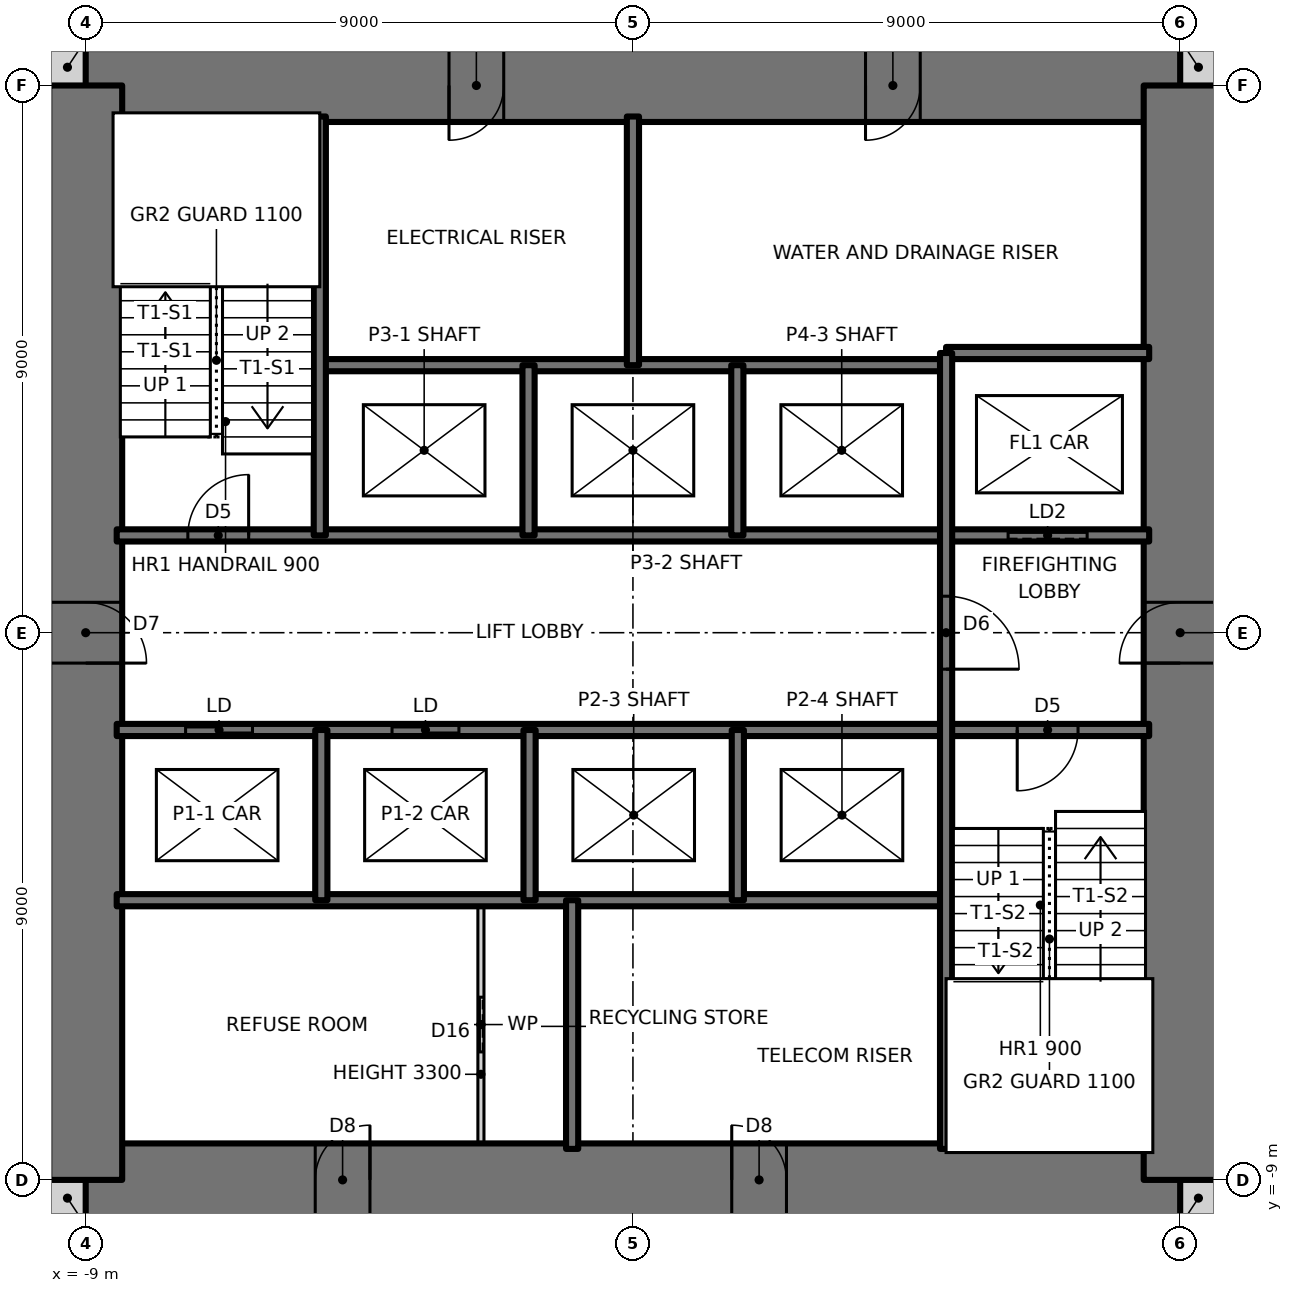
"""IFC4 building model, lengths in metres.
Left out: names, types, materials, properties, quantities, classifications, styles, units other than length and angle.
Written with IfcOpenShell. Run it as: python <this file> out.ifc"""

import sys

from ifc_helpers import new_model, si_unit, direction, frame, frame_2d, origin, place, context, subcontext, project, spatial, rectangle, extrude, element, fill, save


model = new_model("IFC4")
c1 = context("Model", 3, precision=1e-05, world=origin(), true_north=direction((0.0, 1.0)))
c2 = subcontext(c1, "Body", "Model", "MODEL_VIEW")
j1 = project(units=[si_unit("LENGTHUNIT", "METRE"), si_unit("PLANEANGLEUNIT", "RADIAN")], contexts=[c1])
p1 = place(None, origin())
s1 = spatial("IfcSite", under=j1, at=p1, CompositionType="ELEMENT")
p2 = place(p1, origin())
s2 = spatial("IfcBuilding", under=s1, at=p2, CompositionType="ELEMENT")
p3 = place(p2, frame((0.0, 0.0, 67.5)))
s3 = spatial("IfcBuildingStorey", under=s2, at=p3, CompositionType="ELEMENT", Elevation=67.5)
for number, where, z_axis, x_axis in (
    (1, (-9.6, -9.3, 0.0), (0.0, 0.0, 1.0), (1.0, 0.0, 0.0)),
    (2, (9.0, -9.3, 0.0), (0.0, 0.0, 1.0), (1.0, 0.0, 0.0)),
    (3, (9.0, 9.3, 0.0), (0.0, 0.0, 1.0), (1.0, 0.0, 0.0)),
    (4, (-9.6, 9.3, 0.0), (0.0, 0.0, 1.0), (1.0, 0.0, 0.0)),
):
    element("IfcWall", number, at=place(p3, frame(where, z_axis=z_axis, x_axis=x_axis)), inside=s3, PredefinedType="SOLIDWALL", context=c2, shape_type="SweptSolid", body=[
        extrude(rectangle(XDim=0.6, YDim=0.6, at=frame_2d((0.3, 0.0))), origin(), (0.0, 0.0, 1.0), 3.5),
    ])
p4 = place(p3, frame((-9.0, -9.0, 0.0), z_axis=(0.0, 0.0, 1.0), x_axis=(1.0, 0.0, 0.0)))
e5 = element("IfcWall", 5, at=p4, inside=s3, PredefinedType="SHEAR", context=c2, shape_type="SweptSolid", body=[
    extrude(rectangle(XDim=18.0, YDim=1.2, at=frame_2d((9.0, 0.0))), origin(), (0.0, 0.0, 1.0), 3.5),
])
p5 = place(p4, frame((3.775, 0.0, 0.0)))
e6 = element("IfcOpeningElement", 6, at=p5, cuts=e5, PredefinedType="OPENING", context=c2, shape_type="SweptSolid", body=[
    extrude(rectangle(XDim=0.9, YDim=2.1, at=frame_2d((0.45, 1.05))), frame((0.0, 0.61, 0.0), z_axis=(0.0, -1.0, 0.0), x_axis=(1.0, 0.0, 0.0)), (0.0, 0.0, 1.0), 1.22),
])
p6 = place(p4, frame((10.625, 0.0, 0.0)))
e7 = element("IfcOpeningElement", 7, at=p6, cuts=e5, PredefinedType="OPENING", context=c2, shape_type="SweptSolid", body=[
    extrude(rectangle(XDim=0.9, YDim=2.1, at=frame_2d((0.45, 1.05))), frame((0.0, 0.61, 0.0), z_axis=(0.0, -1.0, 0.0), x_axis=(1.0, 0.0, 0.0)), (0.0, 0.0, 1.0), 1.22),
])
p7 = place(p3, frame((9.0, 9.0, 0.0), z_axis=(0.0, 0.0, 1.0), x_axis=(-1.0, 0.0, 0.0)))
e8 = element("IfcWall", 8, at=p7, inside=s3, PredefinedType="SHEAR", context=c2, shape_type="SweptSolid", body=[
    extrude(rectangle(XDim=18.0, YDim=1.2, at=frame_2d((9.0, 0.0))), origin(), (0.0, 0.0, 1.0), 3.5),
])
p8 = place(p7, frame((11.125, 0.0, 0.0)))
e9 = element("IfcOpeningElement", 9, at=p8, cuts=e8, PredefinedType="OPENING", context=c2, shape_type="SweptSolid", body=[
    extrude(rectangle(XDim=0.9, YDim=2.1, at=frame_2d((0.45, 1.05))), frame((0.0, 0.61, 0.0), z_axis=(0.0, -1.0, 0.0), x_axis=(1.0, 0.0, 0.0)), (0.0, 0.0, 1.0), 1.22),
])
p9 = place(p7, frame((4.275, 0.0, 0.0)))
e10 = element("IfcOpeningElement", 10, at=p9, cuts=e8, PredefinedType="OPENING", context=c2, shape_type="SweptSolid", body=[
    extrude(rectangle(XDim=0.9, YDim=2.1, at=frame_2d((0.45, 1.05))), frame((0.0, 0.61, 0.0), z_axis=(0.0, -1.0, 0.0), x_axis=(1.0, 0.0, 0.0)), (0.0, 0.0, 1.0), 1.22),
])
p10 = place(p3, frame((9.0, -9.0, 0.0), z_axis=(0.0, 0.0, 1.0), x_axis=(0.0, 1.0, 0.0)))
e11 = element("IfcWall", 11, at=p10, inside=s3, PredefinedType="SHEAR", context=c2, shape_type="SweptSolid", body=[
    extrude(rectangle(XDim=18.0, YDim=1.2, at=frame_2d((9.0, 0.0))), origin(), (0.0, 0.0, 1.0), 3.5),
])
p11 = place(p10, frame((8.5, 0.0, 0.0)))
e12 = element("IfcOpeningElement", 12, at=p11, cuts=e11, PredefinedType="OPENING", context=c2, shape_type="SweptSolid", body=[
    extrude(rectangle(XDim=1.0, YDim=2.1, at=frame_2d((0.5, 1.05))), frame((0.0, 0.61, 0.0), z_axis=(0.0, -1.0, 0.0), x_axis=(1.0, 0.0, 0.0)), (0.0, 0.0, 1.0), 1.22),
])
p12 = place(p3, frame((-9.0, 9.0, 0.0), z_axis=(0.0, 0.0, 1.0), x_axis=(0.0, -1.0, 0.0)))
e13 = element("IfcWall", 13, at=p12, inside=s3, PredefinedType="SHEAR", context=c2, shape_type="SweptSolid", body=[
    extrude(rectangle(XDim=18.0, YDim=1.2, at=frame_2d((9.0, 0.0))), origin(), (0.0, 0.0, 1.0), 3.5),
])
p13 = place(p12, frame((8.5, 0.0, 0.0)))
e14 = element("IfcOpeningElement", 14, at=p13, cuts=e13, PredefinedType="OPENING", context=c2, shape_type="SweptSolid", body=[
    extrude(rectangle(XDim=1.0, YDim=2.1, at=frame_2d((0.5, 1.05))), frame((0.0, 0.61, 0.0), z_axis=(0.0, -1.0, 0.0), x_axis=(1.0, 0.0, 0.0)), (0.0, 0.0, 1.0), 1.22),
])
p14 = place(p3, frame((-8.49, -4.4, 0.0), z_axis=(0.0, 0.0, 1.0), x_axis=(1.0, 0.0, 0.0)))
e15 = element("IfcWall", 15, at=p14, inside=s3, PredefinedType="SOLIDWALL", context=c2, shape_type="SweptSolid", body=[
    extrude(rectangle(XDim=13.64, YDim=0.2, at=frame_2d((6.82, 0.0))), origin(), (0.0, 0.0, 1.0), 3.5),
])
p15 = place(p3, frame((-8.49, -1.6, 0.0), z_axis=(0.0, 0.0, 1.0), x_axis=(1.0, 0.0, 0.0)))
e16 = element("IfcWall", 16, at=p15, inside=s3, PredefinedType="SOLIDWALL", context=c2, shape_type="SweptSolid", body=[
    extrude(rectangle(XDim=16.98, YDim=0.2, at=frame_2d((8.49, 0.0))), origin(), (0.0, 0.0, 1.0), 3.5),
])
p16 = place(p15, frame((14.81, 0.0, 0.0)))
e17 = element("IfcOpeningElement", 17, at=p16, cuts=e16, PredefinedType="OPENING", context=c2, shape_type="SweptSolid", body=[
    extrude(rectangle(XDim=1.0, YDim=2.1, at=frame_2d((0.5, 1.05))), frame((0.0, 0.11, 0.0), z_axis=(0.0, -1.0, 0.0), x_axis=(1.0, 0.0, 0.0)), (0.0, 0.0, 1.0), 0.22),
])
p17 = place(p15, frame((1.133, 0.0, 0.0)))
e18 = element("IfcOpeningElement", 18, at=p17, cuts=e16, PredefinedType="OPENING", context=c2, shape_type="SweptSolid", body=[
    extrude(rectangle(XDim=1.1, YDim=2.1, at=frame_2d((0.55, 1.05))), frame((0.0, 0.11, 0.0), z_axis=(0.0, -1.0, 0.0), x_axis=(1.0, 0.0, 0.0)), (0.0, 0.0, 1.0), 0.22),
])
p18 = place(p15, frame((4.528, 0.0, 0.0)))
e19 = element("IfcOpeningElement", 19, at=p18, cuts=e16, PredefinedType="OPENING", context=c2, shape_type="SweptSolid", body=[
    extrude(rectangle(XDim=1.1, YDim=2.1, at=frame_2d((0.55, 1.05))), frame((0.0, 0.11, 0.0), z_axis=(0.0, -1.0, 0.0), x_axis=(1.0, 0.0, 0.0)), (0.0, 0.0, 1.0), 0.22),
])
p19 = place(p3, frame((-8.49, 1.6, 0.0), z_axis=(0.0, 0.0, 1.0), x_axis=(1.0, 0.0, 0.0)))
e20 = element("IfcWall", 20, at=p19, inside=s3, PredefinedType="SOLIDWALL", context=c2, shape_type="SweptSolid", body=[
    extrude(rectangle(XDim=16.98, YDim=0.2, at=frame_2d((8.49, 0.0))), origin(), (0.0, 0.0, 1.0), 3.5),
])
p20 = place(p19, frame((1.17, 0.0, 0.0)))
e21 = element("IfcOpeningElement", 21, at=p20, cuts=e20, PredefinedType="OPENING", context=c2, shape_type="SweptSolid", body=[
    extrude(rectangle(XDim=1.0, YDim=2.1, at=frame_2d((0.5, 1.05))), frame((0.0, 0.11, 0.0), z_axis=(0.0, -1.0, 0.0), x_axis=(1.0, 0.0, 0.0)), (0.0, 0.0, 1.0), 0.22),
])
p21 = place(p19, frame((14.66, 0.0, 0.0)))
e22 = element("IfcOpeningElement", 22, at=p21, cuts=e20, PredefinedType="OPENING", context=c2, shape_type="SweptSolid", body=[
    extrude(rectangle(XDim=1.3, YDim=2.1, at=frame_2d((0.65, 1.05))), frame((0.0, 0.11, 0.0), z_axis=(0.0, -1.0, 0.0), x_axis=(1.0, 0.0, 0.0)), (0.0, 0.0, 1.0), 0.22),
])
p22 = place(p3, frame((-5.15, 4.4, 0.0), z_axis=(0.0, 0.0, 1.0), x_axis=(1.0, 0.0, 0.0)))
e23 = element("IfcWall", 23, at=p22, inside=s3, PredefinedType="SOLIDWALL", context=c2, shape_type="SweptSolid", body=[
    extrude(rectangle(XDim=10.3, YDim=0.2, at=frame_2d((5.15, 0.0))), origin(), (0.0, 0.0, 1.0), 3.5),
])
p23 = place(p3, frame((5.15, 4.6, 0.0), z_axis=(0.0, 0.0, 1.0), x_axis=(1.0, 0.0, 0.0)))
e24 = element("IfcWall", 24, at=p23, inside=s3, PredefinedType="SOLIDWALL", context=c2, shape_type="SweptSolid", body=[
    extrude(rectangle(XDim=3.34, YDim=0.2, at=frame_2d((1.67, 0.0))), origin(), (0.0, 0.0, 1.0), 3.5),
])
p24 = place(p3, frame((5.15, -8.49, 0.0), z_axis=(0.0, 0.0, 1.0), x_axis=(0.0, 1.0, 0.0)))
e25 = element("IfcWall", 25, at=p24, inside=s3, PredefinedType="SOLIDWALL", context=c2, shape_type="SweptSolid", body=[
    extrude(rectangle(XDim=13.09, YDim=0.2, at=frame_2d((6.545, 0.0))), origin(), (0.0, 0.0, 1.0), 3.5),
])
p25 = place(p24, frame((7.89, 0.0, 0.0)))
e26 = element("IfcOpeningElement", 26, at=p25, cuts=e25, PredefinedType="OPENING", context=c2, shape_type="SweptSolid", body=[
    extrude(rectangle(XDim=1.2, YDim=2.1, at=frame_2d((0.6, 1.05))), frame((0.0, 0.11, 0.0), z_axis=(0.0, -1.0, 0.0), x_axis=(1.0, 0.0, 0.0)), (0.0, 0.0, 1.0), 0.22),
])
for number, where, z_axis, x_axis in (
    (27, (1.725, -4.4, 0.0), (0.0, 0.0, 1.0), (0.0, 1.0, 0.0)),
    (28, (1.717, 1.6, 0.0), (0.0, 0.0, 1.0), (0.0, 1.0, 0.0)),
):
    element("IfcWall", number, at=place(p3, frame(where, z_axis=z_axis, x_axis=x_axis)), inside=s3, PredefinedType="SOLIDWALL", context=c2, shape_type="SweptSolid", body=[
        extrude(rectangle(XDim=2.8, YDim=0.2, at=frame_2d((1.4, 0.0))), origin(), (0.0, 0.0, 1.0), 3.5),
    ])
for number, where, z_axis, x_axis in (
    (29, (0.0, 4.4, 0.0), (0.0, 0.0, 1.0), (0.0, 1.0, 0.0)),
    (30, (-1.0, -8.49, 0.0), (0.0, 0.0, 1.0), (0.0, 1.0, 0.0)),
):
    element("IfcWall", number, at=place(p3, frame(where, z_axis=z_axis, x_axis=x_axis)), inside=s3, PredefinedType="SOLIDWALL", context=c2, shape_type="SweptSolid", body=[
        extrude(rectangle(XDim=4.09, YDim=0.2, at=frame_2d((2.045, 0.0))), origin(), (0.0, 0.0, 1.0), 3.5),
    ])
for number, where, z_axis, x_axis in (
    (31, (-1.7, -4.4, 0.0), (0.0, 0.0, 1.0), (0.0, 1.0, 0.0)),
    (32, (-1.717, 1.6, 0.0), (0.0, 0.0, 1.0), (0.0, 1.0, 0.0)),
):
    element("IfcWall", number, at=place(p3, frame(where, z_axis=z_axis, x_axis=x_axis)), inside=s3, PredefinedType="SOLIDWALL", context=c2, shape_type="SweptSolid", body=[
        extrude(rectangle(XDim=2.8, YDim=0.2, at=frame_2d((1.4, 0.0))), origin(), (0.0, 0.0, 1.0), 3.5),
    ])
p26 = place(p3, frame((-2.5, -8.49, 0.0), z_axis=(0.0, 0.0, 1.0), x_axis=(0.0, 1.0, 0.0)))
e33 = element("IfcWall", 33, at=p26, inside=s3, PredefinedType="PARTITIONING", context=c2, shape_type="SweptSolid", body=[
    extrude(rectangle(XDim=4.09, YDim=0.1, at=frame_2d((2.045, 0.0))), origin(), (0.0, 0.0, 1.0), 3.3),
])
p27 = place(p26, frame((1.595, 0.0, 0.0)))
e34 = element("IfcOpeningElement", 34, at=p27, cuts=e33, PredefinedType="OPENING", context=c2, shape_type="SweptSolid", body=[
    extrude(rectangle(XDim=0.9, YDim=2.1, at=frame_2d((0.45, 1.05))), frame((0.0, 0.06, 0.0), z_axis=(0.0, -1.0, 0.0), x_axis=(1.0, 0.0, 0.0)), (0.0, 0.0, 1.0), 0.12),
])
p28 = place(p3, frame((-5.125, -4.4, 0.0), z_axis=(0.0, 0.0, 1.0), x_axis=(0.0, 1.0, 0.0)))
e35 = element("IfcWall", 35, at=p28, inside=s3, PredefinedType="SOLIDWALL", context=c2, shape_type="SweptSolid", body=[
    extrude(rectangle(XDim=2.8, YDim=0.2, at=frame_2d((1.4, 0.0))), origin(), (0.0, 0.0, 1.0), 3.5),
])
p29 = place(p3, frame((-5.15, 1.6, 0.0), z_axis=(0.0, 0.0, 1.0), x_axis=(0.0, 1.0, 0.0)))
e36 = element("IfcWall", 36, at=p29, inside=s3, PredefinedType="SOLIDWALL", context=c2, shape_type="SweptSolid", body=[
    extrude(rectangle(XDim=6.89, YDim=0.2, at=frame_2d((3.445, 0.0))), origin(), (0.0, 0.0, 1.0), 3.5),
])
p30 = place(p20, origin())
e37 = element("IfcDoor", 37, at=p30, inside=s3, OperationType="SINGLE_SWING_RIGHT", PredefinedType="DOOR", context=c2, shape_type="SweptSolid", body=[
    extrude(rectangle(XDim=1.0, YDim=2.1, at=frame_2d((0.5, 1.05))), frame((0.0, 0.025, 0.0), z_axis=(0.0, -1.0, 0.0), x_axis=(1.0, 0.0, 0.0)), (0.0, 0.0, 1.0), 0.05),
])
fill(e21, e37)
p31 = place(p16, frame((1.0, 0.0, 0.0), z_axis=(0.0, 0.0, 1.0), x_axis=(-1.0, 0.0, 0.0)))
e38 = element("IfcDoor", 38, at=p31, inside=s3, OperationType="SINGLE_SWING_RIGHT", PredefinedType="DOOR", context=c2, shape_type="SweptSolid", body=[
    extrude(rectangle(XDim=1.0, YDim=2.1, at=frame_2d((0.5, 1.05))), frame((0.0, 0.025, 0.0), z_axis=(0.0, -1.0, 0.0), x_axis=(1.0, 0.0, 0.0)), (0.0, 0.0, 1.0), 0.05),
])
fill(e17, e38)
p32 = place(p25, frame((1.2, 0.0, 0.0), z_axis=(0.0, 0.0, 1.0), x_axis=(-1.0, 0.0, 0.0)))
e39 = element("IfcDoor", 39, at=p32, inside=s3, OperationType="SINGLE_SWING_RIGHT", PredefinedType="DOOR", context=c2, shape_type="SweptSolid", body=[
    extrude(rectangle(XDim=1.2, YDim=2.1, at=frame_2d((0.6, 1.05))), frame((0.0, 0.025, 0.0), z_axis=(0.0, -1.0, 0.0), x_axis=(1.0, 0.0, 0.0)), (0.0, 0.0, 1.0), 0.05),
])
fill(e26, e39)
p33 = place(p27, origin())
e40 = element("IfcDoor", 40, at=p33, inside=s3, OperationType="SLIDING_TO_LEFT", PredefinedType="DOOR", context=c2, shape_type="SweptSolid", body=[
    extrude(rectangle(XDim=0.9, YDim=2.1, at=frame_2d((0.45, 1.05))), frame((0.0, 0.025, 0.0), z_axis=(0.0, -1.0, 0.0), x_axis=(1.0, 0.0, 0.0)), (0.0, 0.0, 1.0), 0.05),
])
fill(e34, e40)
p34 = place(p13, origin())
e41 = element("IfcDoor", 41, at=p34, inside=s3, OperationType="SINGLE_SWING_RIGHT", PredefinedType="DOOR", context=c2, shape_type="SweptSolid", body=[
    extrude(rectangle(XDim=1.0, YDim=2.1, at=frame_2d((0.5, 1.05))), frame((0.0, 0.025, 0.0), z_axis=(0.0, -1.0, 0.0), x_axis=(1.0, 0.0, 0.0)), (0.0, 0.0, 1.0), 0.05),
])
fill(e14, e41)
p35 = place(p11, origin())
e42 = element("IfcDoor", 42, at=p35, inside=s3, OperationType="SINGLE_SWING_LEFT", PredefinedType="DOOR", context=c2, shape_type="SweptSolid", body=[
    extrude(rectangle(XDim=1.0, YDim=2.1, at=frame_2d((0.5, 1.05))), frame((0.0, 0.025, 0.0), z_axis=(0.0, -1.0, 0.0), x_axis=(1.0, 0.0, 0.0)), (0.0, 0.0, 1.0), 0.05),
])
fill(e12, e42)
p36 = place(p8, origin())
e43 = element("IfcDoor", 43, at=p36, inside=s3, OperationType="SINGLE_SWING_RIGHT", PredefinedType="DOOR", context=c2, shape_type="SweptSolid", body=[
    extrude(rectangle(XDim=0.9, YDim=2.1, at=frame_2d((0.45, 1.05))), frame((0.0, 0.025, 0.0), z_axis=(0.0, -1.0, 0.0), x_axis=(1.0, 0.0, 0.0)), (0.0, 0.0, 1.0), 0.05),
])
fill(e9, e43)
p37 = place(p9, origin())
e44 = element("IfcDoor", 44, at=p37, inside=s3, OperationType="SINGLE_SWING_RIGHT", PredefinedType="DOOR", context=c2, shape_type="SweptSolid", body=[
    extrude(rectangle(XDim=0.9, YDim=2.1, at=frame_2d((0.45, 1.05))), frame((0.0, 0.025, 0.0), z_axis=(0.0, -1.0, 0.0), x_axis=(1.0, 0.0, 0.0)), (0.0, 0.0, 1.0), 0.05),
])
fill(e10, e44)
p38 = place(p5, origin())
e45 = element("IfcDoor", 45, at=p38, inside=s3, OperationType="SINGLE_SWING_RIGHT", PredefinedType="DOOR", context=c2, shape_type="SweptSolid", body=[
    extrude(rectangle(XDim=0.9, YDim=2.1, at=frame_2d((0.45, 1.05))), frame((0.0, 0.025, 0.0), z_axis=(0.0, -1.0, 0.0), x_axis=(1.0, 0.0, 0.0)), (0.0, 0.0, 1.0), 0.05),
])
fill(e6, e45)
p39 = place(p6, origin())
e46 = element("IfcDoor", 46, at=p39, inside=s3, OperationType="SINGLE_SWING_LEFT", PredefinedType="DOOR", context=c2, shape_type="SweptSolid", body=[
    extrude(rectangle(XDim=0.9, YDim=2.1, at=frame_2d((0.45, 1.05))), frame((0.0, 0.025, 0.0), z_axis=(0.0, -1.0, 0.0), x_axis=(1.0, 0.0, 0.0)), (0.0, 0.0, 1.0), 0.05),
])
fill(e7, e46)
p40 = place(p17, origin())
e47 = element("IfcDoor", 47, at=p40, inside=s3, OperationType="DOUBLE_DOOR_SLIDING", PredefinedType="DOOR", context=c2, shape_type="SweptSolid", body=[
    extrude(rectangle(XDim=1.1, YDim=2.1, at=frame_2d((0.55, 1.05))), frame((0.0, 0.025, 0.0), z_axis=(0.0, -1.0, 0.0), x_axis=(1.0, 0.0, 0.0)), (0.0, 0.0, 1.0), 0.05),
])
fill(e18, e47)
p41 = place(p18, origin())
e48 = element("IfcDoor", 48, at=p41, inside=s3, OperationType="DOUBLE_DOOR_SLIDING", PredefinedType="DOOR", context=c2, shape_type="SweptSolid", body=[
    extrude(rectangle(XDim=1.1, YDim=2.1, at=frame_2d((0.55, 1.05))), frame((0.0, 0.025, 0.0), z_axis=(0.0, -1.0, 0.0), x_axis=(1.0, 0.0, 0.0)), (0.0, 0.0, 1.0), 0.05),
])
fill(e19, e48)
p42 = place(p21, origin())
e49 = element("IfcDoor", 49, at=p42, inside=s3, OperationType="SLIDING_TO_LEFT", PredefinedType="DOOR", context=c2, shape_type="SweptSolid", body=[
    extrude(rectangle(XDim=1.3, YDim=2.1, at=frame_2d((0.65, 1.05))), frame((0.0, 0.025, 0.0), z_axis=(0.0, -1.0, 0.0), x_axis=(1.0, 0.0, 0.0)), (0.0, 0.0, 1.0), 0.05),
])
fill(e22, e49)
save(model, sys.argv[1])
